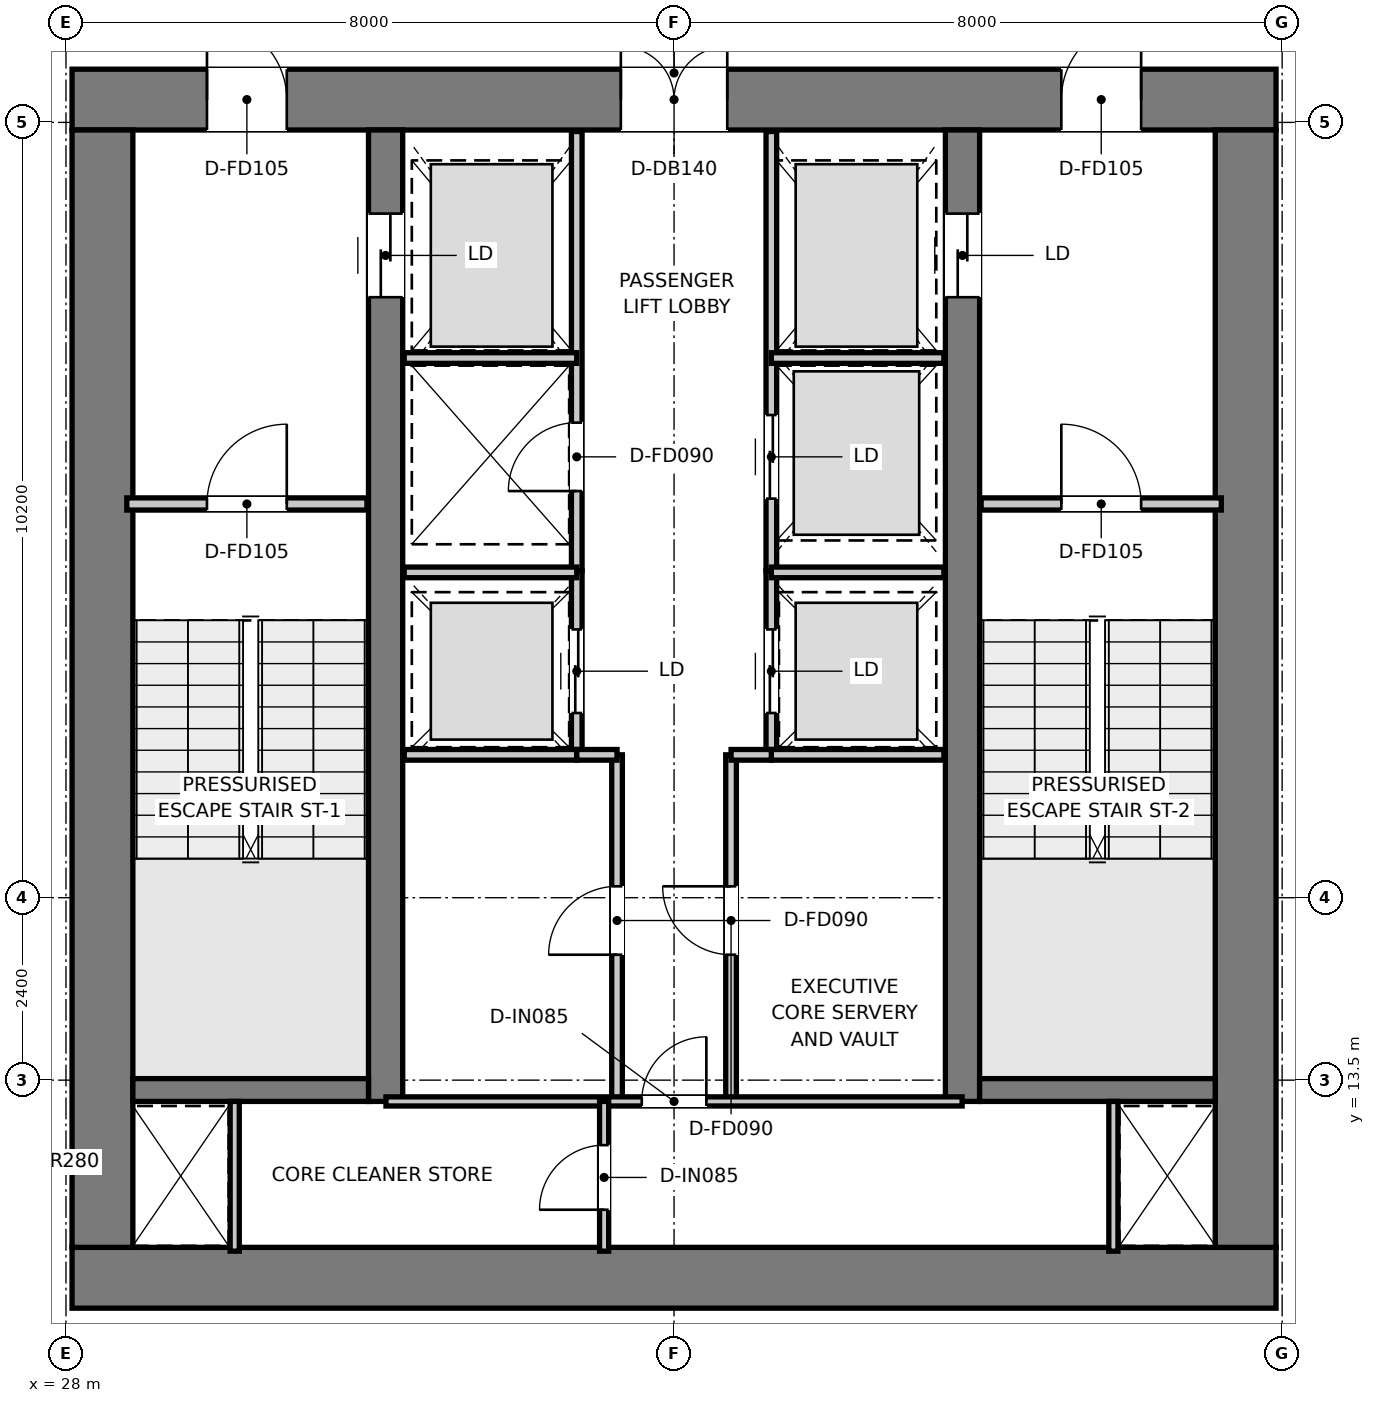
"""IFC4 building model, lengths in metres.
Left out: names, types, materials, properties, quantities, classifications, styles, units other than length and angle.
Written with IfcOpenShell. Run it as: python <this file> out.ifc"""

import sys

from ifc_helpers import new_model, si_unit, direction, frame, frame_2d, origin, place, context, subcontext, project, spatial, rectangle, extrude, element, fill, save


model = new_model("IFC4")
c1 = context("Model", 3, precision=1e-05, world=origin(), true_north=direction((0.0, 1.0)))
c2 = subcontext(c1, "Body", "Model", "MODEL_VIEW")
j1 = project(units=[si_unit("LENGTHUNIT", "METRE"), si_unit("PLANEANGLEUNIT", "RADIAN")], contexts=[c1])
p1 = place(None, origin())
s1 = spatial("IfcSite", under=j1, at=p1, CompositionType="ELEMENT")
p2 = place(p1, origin())
s2 = spatial("IfcBuilding", under=s1, at=p2, CompositionType="ELEMENT")
p3 = place(p2, frame((0.0, 0.0, 295.05)))
s3 = spatial("IfcBuildingStorey", under=s2, at=p3, CompositionType="ELEMENT", Elevation=295.05)
p4 = place(p3, frame((28.08, 10.9, 0.0), z_axis=(0.0, 0.0, 1.0), x_axis=(1.0, 0.0, 0.0)))
e1 = element("IfcWall", 1, at=p4, inside=s3, PredefinedType="SHEAR", context=c2, shape_type="SweptSolid", body=[
    extrude(rectangle(XDim=15.84, YDim=0.8, at=frame_2d((7.92, 0.0))), origin(), (0.0, 0.0, 1.0), 3.95),
])
p5 = place(p3, frame((28.08, 26.4, 0.0), z_axis=(0.0, 0.0, 1.0), x_axis=(1.0, 0.0, 0.0)))
e2 = element("IfcWall", 2, at=p5, inside=s3, PredefinedType="SHEAR", context=c2, shape_type="SweptSolid", body=[
    extrude(rectangle(XDim=15.84, YDim=0.8, at=frame_2d((7.92, 0.0))), origin(), (0.0, 0.0, 1.0), 3.95),
])
p6 = place(p5, frame((7.22, 0.0, 0.0)))
e3 = element("IfcOpeningElement", 3, at=p6, cuts=e2, PredefinedType="OPENING", context=c2, shape_type="SweptSolid", body=[
    extrude(rectangle(XDim=1.4, YDim=2.2, at=frame_2d((0.7, 1.1))), frame((0.0, 0.41, 0.0), z_axis=(0.0, -1.0, 0.0), x_axis=(1.0, 0.0, 0.0)), (0.0, 0.0, 1.0), 0.82),
])
p7 = place(p5, frame((1.775, 0.0, 0.0)))
e4 = element("IfcOpeningElement", 4, at=p7, cuts=e2, PredefinedType="OPENING", context=c2, shape_type="SweptSolid", body=[
    extrude(rectangle(XDim=1.05, YDim=2.1, at=frame_2d((0.525, 1.05))), frame((0.0, 0.41, 0.0), z_axis=(0.0, -1.0, 0.0), x_axis=(1.0, 0.0, 0.0)), (0.0, 0.0, 1.0), 0.82),
])
p8 = place(p5, frame((13.015, 0.0, 0.0)))
e5 = element("IfcOpeningElement", 5, at=p8, cuts=e2, PredefinedType="OPENING", context=c2, shape_type="SweptSolid", body=[
    extrude(rectangle(XDim=1.05, YDim=2.1, at=frame_2d((0.525, 1.05))), frame((0.0, 0.41, 0.0), z_axis=(0.0, -1.0, 0.0), x_axis=(1.0, 0.0, 0.0)), (0.0, 0.0, 1.0), 0.82),
])
for number, where, z_axis, x_axis in (
    (6, (28.48, 11.3, 0.0), (0.0, 0.0, 1.0), (0.0, 1.0, 0.0)),
    (7, (43.52, 11.3, 0.0), (0.0, 0.0, 1.0), (0.0, 1.0, 0.0)),
):
    element("IfcWall", number, at=place(p3, frame(where, z_axis=z_axis, x_axis=x_axis)), inside=s3, PredefinedType="SHEAR", context=c2, shape_type="SweptSolid", body=[
        extrude(rectangle(XDim=14.7, YDim=0.8, at=frame_2d((7.35, 0.0))), origin(), (0.0, 0.0, 1.0), 3.95),
    ])
p9 = place(p3, frame((32.205, 13.22, 0.0), z_axis=(0.0, 0.0, 1.0), x_axis=(0.0, 1.0, 0.0)))
e8 = element("IfcWall", 8, at=p9, inside=s3, PredefinedType="SHEAR", context=c2, shape_type="SweptSolid", body=[
    extrude(rectangle(XDim=12.78, YDim=0.45, at=frame_2d((6.39, 0.0))), origin(), (0.0, 0.0, 1.0), 3.95),
])
p10 = place(p9, frame((10.58, 0.0, 0.0)))
e9 = element("IfcOpeningElement", 9, at=p10, cuts=e8, PredefinedType="OPENING", context=c2, shape_type="SweptSolid", body=[
    extrude(rectangle(XDim=1.1, YDim=2.15, at=frame_2d((0.55, 1.075))), frame((0.0, 0.235, 0.0), z_axis=(0.0, -1.0, 0.0), x_axis=(1.0, 0.0, 0.0)), (0.0, 0.0, 1.0), 0.47),
])
p11 = place(p3, frame((39.795, 13.22, 0.0), z_axis=(0.0, 0.0, 1.0), x_axis=(0.0, 1.0, 0.0)))
e10 = element("IfcWall", 10, at=p11, inside=s3, PredefinedType="SHEAR", context=c2, shape_type="SweptSolid", body=[
    extrude(rectangle(XDim=12.78, YDim=0.45, at=frame_2d((6.39, 0.0))), origin(), (0.0, 0.0, 1.0), 3.95),
])
p12 = place(p11, frame((10.58, 0.0, 0.0)))
e11 = element("IfcOpeningElement", 11, at=p12, cuts=e10, PredefinedType="OPENING", context=c2, shape_type="SweptSolid", body=[
    extrude(rectangle(XDim=1.1, YDim=2.15, at=frame_2d((0.55, 1.075))), frame((0.0, 0.235, 0.0), z_axis=(0.0, -1.0, 0.0), x_axis=(1.0, 0.0, 0.0)), (0.0, 0.0, 1.0), 0.47),
])
for number, where, z_axis, x_axis in (
    (12, (28.88, 13.37, 0.0), (0.0, 0.0, 1.0), (1.0, 0.0, 0.0)),
    (13, (40.02, 13.37, 0.0), (0.0, 0.0, 1.0), (1.0, 0.0, 0.0)),
):
    element("IfcWall", number, at=place(p3, frame(where, z_axis=z_axis, x_axis=x_axis)), inside=s3, PredefinedType="SHEAR", context=c2, shape_type="SweptSolid", body=[
        extrude(rectangle(XDim=3.1, YDim=0.3, at=frame_2d((1.55, 0.0))), origin(), (0.0, 0.0, 1.0), 3.95),
    ])
p13 = place(p3, frame((28.8, 21.08, 0.0), z_axis=(0.0, 0.0, 1.0), x_axis=(1.0, 0.0, 0.0)))
e14 = element("IfcWall", 14, at=p13, inside=s3, PredefinedType="PARTITIONING", context=c2, shape_type="SweptSolid", body=[
    extrude(rectangle(XDim=3.16, YDim=0.16, at=frame_2d((1.58, 0.0))), origin(), (0.0, 0.0, 1.0), 3.67),
])
p14 = place(p13, frame((1.055, 0.0, 0.0)))
e15 = element("IfcOpeningElement", 15, at=p14, cuts=e14, PredefinedType="OPENING", context=c2, shape_type="SweptSolid", body=[
    extrude(rectangle(XDim=1.05, YDim=2.1, at=frame_2d((0.525, 1.05))), frame((0.0, 0.09, 0.0), z_axis=(0.0, -1.0, 0.0), x_axis=(1.0, 0.0, 0.0)), (0.0, 0.0, 1.0), 0.18),
])
p15 = place(p3, frame((40.04, 21.08, 0.0), z_axis=(0.0, 0.0, 1.0), x_axis=(1.0, 0.0, 0.0)))
e16 = element("IfcWall", 16, at=p15, inside=s3, PredefinedType="PARTITIONING", context=c2, shape_type="SweptSolid", body=[
    extrude(rectangle(XDim=3.16, YDim=0.16, at=frame_2d((1.58, 0.0))), origin(), (0.0, 0.0, 1.0), 3.67),
])
p16 = place(p15, frame((1.055, 0.0, 0.0)))
e17 = element("IfcOpeningElement", 17, at=p16, cuts=e16, PredefinedType="OPENING", context=c2, shape_type="SweptSolid", body=[
    extrude(rectangle(XDim=1.05, YDim=2.1, at=frame_2d((0.525, 1.05))), frame((0.0, 0.09, 0.0), z_axis=(0.0, -1.0, 0.0), x_axis=(1.0, 0.0, 0.0)), (0.0, 0.0, 1.0), 0.18),
])
p17 = place(p3, frame((34.72, 20.2, 0.0), z_axis=(0.0, 0.0, 1.0), x_axis=(0.0, 1.0, 0.0)))
e18 = element("IfcWall", 18, at=p17, inside=s3, PredefinedType="PARTITIONING", context=c2, shape_type="SweptSolid", body=[
    extrude(rectangle(XDim=5.78, YDim=0.14, at=frame_2d((2.89, 0.0))), origin(), (0.0, 0.0, 1.0), 2.82),
])
p18 = place(p17, frame((1.05, 0.0, 0.0)))
e19 = element("IfcOpeningElement", 19, at=p18, cuts=e18, PredefinedType="OPENING", context=c2, shape_type="SweptSolid", body=[
    extrude(rectangle(XDim=0.9, YDim=2.1, at=frame_2d((0.45, 1.05))), frame((0.0, 0.08, 0.0), z_axis=(0.0, -1.0, 0.0), x_axis=(1.0, 0.0, 0.0)), (0.0, 0.0, 1.0), 0.16),
])
p19 = place(p3, frame((37.28, 20.2, 0.0), z_axis=(0.0, 0.0, 1.0), x_axis=(0.0, 1.0, 0.0)))
e20 = element("IfcWall", 20, at=p19, inside=s3, PredefinedType="PARTITIONING", context=c2, shape_type="SweptSolid", body=[
    extrude(rectangle(XDim=5.78, YDim=0.14, at=frame_2d((2.89, 0.0))), origin(), (0.0, 0.0, 1.0), 2.82),
])
p20 = place(p19, frame((0.95, 0.0, 0.0)))
e21 = element("IfcOpeningElement", 21, at=p20, cuts=e20, PredefinedType="OPENING", context=c2, shape_type="SweptSolid", body=[
    extrude(rectangle(XDim=1.1, YDim=2.15, at=frame_2d((0.55, 1.075))), frame((0.0, 0.08, 0.0), z_axis=(0.0, -1.0, 0.0), x_axis=(1.0, 0.0, 0.0)), (0.0, 0.0, 1.0), 0.16),
])
for number, where, z_axis, x_axis in (
    (22, (32.45, 23.0, 0.0), (0.0, 0.0, 1.0), (1.0, 0.0, 0.0)),
    (23, (37.28, 23.0, 0.0), (0.0, 0.0, 1.0), (1.0, 0.0, 0.0)),
):
    element("IfcWall", number, at=place(p3, frame(where, z_axis=z_axis, x_axis=x_axis)), inside=s3, PredefinedType="PARTITIONING", context=c2, shape_type="SweptSolid", body=[
        extrude(rectangle(XDim=2.27, YDim=0.14, at=frame_2d((1.135, 0.0))), origin(), (0.0, 0.0, 1.0), 2.82),
    ])
p21 = place(p3, frame((34.72, 17.78, 0.0), z_axis=(0.0, 0.0, 1.0), x_axis=(0.0, 1.0, 0.0)))
e24 = element("IfcWall", 24, at=p21, inside=s3, PredefinedType="PARTITIONING", context=c2, shape_type="SweptSolid", body=[
    extrude(rectangle(XDim=2.42, YDim=0.14, at=frame_2d((1.21, 0.0))), origin(), (0.0, 0.0, 1.0), 3.67),
])
p22 = place(p21, frame((0.55, 0.0, 0.0)))
e25 = element("IfcOpeningElement", 25, at=p22, cuts=e24, PredefinedType="OPENING", context=c2, shape_type="SweptSolid", body=[
    extrude(rectangle(XDim=1.1, YDim=2.15, at=frame_2d((0.55, 1.075))), frame((0.0, 0.08, 0.0), z_axis=(0.0, -1.0, 0.0), x_axis=(1.0, 0.0, 0.0)), (0.0, 0.0, 1.0), 0.16),
])
p23 = place(p3, frame((37.28, 17.78, 0.0), z_axis=(0.0, 0.0, 1.0), x_axis=(0.0, 1.0, 0.0)))
e26 = element("IfcWall", 26, at=p23, inside=s3, PredefinedType="PARTITIONING", context=c2, shape_type="SweptSolid", body=[
    extrude(rectangle(XDim=2.42, YDim=0.14, at=frame_2d((1.21, 0.0))), origin(), (0.0, 0.0, 1.0), 3.67),
])
p24 = place(p23, frame((0.55, 0.0, 0.0)))
e27 = element("IfcOpeningElement", 27, at=p24, cuts=e26, PredefinedType="OPENING", context=c2, shape_type="SweptSolid", body=[
    extrude(rectangle(XDim=1.1, YDim=2.15, at=frame_2d((0.55, 1.075))), frame((0.0, 0.08, 0.0), z_axis=(0.0, -1.0, 0.0), x_axis=(1.0, 0.0, 0.0)), (0.0, 0.0, 1.0), 0.16),
])
for number, where, z_axis, x_axis in (
    (28, (32.45, 17.78, 0.0), (0.0, 0.0, 1.0), (1.0, 0.0, 0.0)),
    (29, (32.45, 20.18, 0.0), (0.0, 0.0, 1.0), (1.0, 0.0, 0.0)),
    (30, (37.28, 17.78, 0.0), (0.0, 0.0, 1.0), (1.0, 0.0, 0.0)),
    (31, (37.28, 20.18, 0.0), (0.0, 0.0, 1.0), (1.0, 0.0, 0.0)),
):
    element("IfcWall", number, at=place(p3, frame(where, z_axis=z_axis, x_axis=x_axis)), inside=s3, PredefinedType="PARTITIONING", context=c2, shape_type="SweptSolid", body=[
        extrude(rectangle(XDim=2.27, YDim=0.14, at=frame_2d((1.135, 0.0))), origin(), (0.0, 0.0, 1.0), 3.67),
    ])
p25 = place(p3, frame((35.25, 13.22, 0.0), z_axis=(0.0, 0.0, 1.0), x_axis=(0.0, 1.0, 0.0)))
e32 = element("IfcWall", 32, at=p25, inside=s3, PredefinedType="PARTITIONING", context=c2, shape_type="SweptSolid", body=[
    extrude(rectangle(XDim=4.56, YDim=0.14, at=frame_2d((2.28, 0.0))), origin(), (0.0, 0.0, 1.0), 3.67),
])
p26 = place(p25, frame((1.93, 0.0, 0.0)))
e33 = element("IfcOpeningElement", 33, at=p26, cuts=e32, PredefinedType="OPENING", context=c2, shape_type="SweptSolid", body=[
    extrude(rectangle(XDim=0.9, YDim=2.1, at=frame_2d((0.45, 1.05))), frame((0.0, 0.08, 0.0), z_axis=(0.0, -1.0, 0.0), x_axis=(1.0, 0.0, 0.0)), (0.0, 0.0, 1.0), 0.16),
])
p27 = place(p3, frame((34.72, 17.78, 0.0), z_axis=(0.0, 0.0, 1.0), x_axis=(1.0, 0.0, 0.0)))
e34 = element("IfcWall", 34, at=p27, inside=s3, PredefinedType="PARTITIONING", context=c2, shape_type="SweptSolid", body=[
    extrude(rectangle(XDim=0.53, YDim=0.14, at=frame_2d((0.265, 0.0))), origin(), (0.0, 0.0, 1.0), 3.67),
])
p28 = place(p3, frame((36.75, 13.22, 0.0), z_axis=(0.0, 0.0, 1.0), x_axis=(0.0, 1.0, 0.0)))
e35 = element("IfcWall", 35, at=p28, inside=s3, PredefinedType="PARTITIONING", context=c2, shape_type="SweptSolid", body=[
    extrude(rectangle(XDim=4.56, YDim=0.14, at=frame_2d((2.28, 0.0))), origin(), (0.0, 0.0, 1.0), 3.67),
])
p29 = place(p28, frame((1.93, 0.0, 0.0)))
e36 = element("IfcOpeningElement", 36, at=p29, cuts=e35, PredefinedType="OPENING", context=c2, shape_type="SweptSolid", body=[
    extrude(rectangle(XDim=0.9, YDim=2.1, at=frame_2d((0.45, 1.05))), frame((0.0, 0.08, 0.0), z_axis=(0.0, -1.0, 0.0), x_axis=(1.0, 0.0, 0.0)), (0.0, 0.0, 1.0), 0.16),
])
p30 = place(p3, frame((36.75, 17.78, 0.0), z_axis=(0.0, 0.0, 1.0), x_axis=(1.0, 0.0, 0.0)))
e37 = element("IfcWall", 37, at=p30, inside=s3, PredefinedType="PARTITIONING", context=c2, shape_type="SweptSolid", body=[
    extrude(rectangle(XDim=0.53, YDim=0.14, at=frame_2d((0.265, 0.0))), origin(), (0.0, 0.0, 1.0), 3.67),
])
for number, where, z_axis, x_axis in (
    (38, (30.22, 11.25, 0.0), (0.0, 0.0, 1.0), (0.0, 1.0, 0.0)),
    (39, (41.78, 11.25, 0.0), (0.0, 0.0, 1.0), (0.0, 1.0, 0.0)),
):
    element("IfcWall", number, at=place(p3, frame(where, z_axis=z_axis, x_axis=x_axis)), inside=s3, PredefinedType="PARTITIONING", context=c2, shape_type="SweptSolid", body=[
        extrude(rectangle(XDim=1.97, YDim=0.12, at=frame_2d((0.985, 0.0))), origin(), (0.0, 0.0, 1.0), 3.67),
    ])
p31 = place(p3, frame((32.21, 13.22, 0.0), z_axis=(0.0, 0.0, 1.0), x_axis=(1.0, 0.0, 0.0)))
e40 = element("IfcWall", 40, at=p31, inside=s3, PredefinedType="PARTITIONING", context=c2, shape_type="SweptSolid", body=[
    extrude(rectangle(XDim=7.58, YDim=0.12, at=frame_2d((3.79, 0.0))), origin(), (0.0, 0.0, 1.0), 3.67),
])
p32 = place(p31, frame((3.365, 0.0, 0.0)))
e41 = element("IfcOpeningElement", 41, at=p32, cuts=e40, PredefinedType="OPENING", context=c2, shape_type="SweptSolid", body=[
    extrude(rectangle(XDim=0.85, YDim=2.1, at=frame_2d((0.425, 1.05))), frame((0.0, 0.07, 0.0), z_axis=(0.0, -1.0, 0.0), x_axis=(1.0, 0.0, 0.0)), (0.0, 0.0, 1.0), 0.14),
])
p33 = place(p3, frame((35.08, 11.25, 0.0), z_axis=(0.0, 0.0, 1.0), x_axis=(0.0, 1.0, 0.0)))
e42 = element("IfcWall", 42, at=p33, inside=s3, PredefinedType="PARTITIONING", context=c2, shape_type="SweptSolid", body=[
    extrude(rectangle(XDim=1.97, YDim=0.12, at=frame_2d((0.985, 0.0))), origin(), (0.0, 0.0, 1.0), 3.67),
])
p34 = place(p33, frame((0.545, 0.0, 0.0)))
e43 = element("IfcOpeningElement", 43, at=p34, cuts=e42, PredefinedType="OPENING", context=c2, shape_type="SweptSolid", body=[
    extrude(rectangle(XDim=0.85, YDim=2.1, at=frame_2d((0.425, 1.05))), frame((0.0, 0.07, 0.0), z_axis=(0.0, -1.0, 0.0), x_axis=(1.0, 0.0, 0.0)), (0.0, 0.0, 1.0), 0.14),
])
p35 = place(p14, origin())
e44 = element("IfcDoor", 44, at=p35, inside=s3, OperationType="SINGLE_SWING_RIGHT", PredefinedType="DOOR", context=c2, shape_type="SweptSolid", body=[
    extrude(rectangle(XDim=1.05, YDim=2.1, at=frame_2d((0.525, 1.05))), frame((0.0, 0.025, 0.0), z_axis=(0.0, -1.0, 0.0), x_axis=(1.0, 0.0, 0.0)), (0.0, 0.0, 1.0), 0.05),
])
fill(e15, e44)
p36 = place(p16, origin())
e45 = element("IfcDoor", 45, at=p36, inside=s3, OperationType="SINGLE_SWING_LEFT", PredefinedType="DOOR", context=c2, shape_type="SweptSolid", body=[
    extrude(rectangle(XDim=1.05, YDim=2.1, at=frame_2d((0.525, 1.05))), frame((0.0, 0.025, 0.0), z_axis=(0.0, -1.0, 0.0), x_axis=(1.0, 0.0, 0.0)), (0.0, 0.0, 1.0), 0.05),
])
fill(e17, e45)
p37 = place(p6, origin())
e46 = element("IfcDoor", 46, at=p37, inside=s3, OperationType="DOUBLE_DOOR_SINGLE_SWING", PredefinedType="DOOR", context=c2, shape_type="SweptSolid", body=[
    extrude(rectangle(XDim=1.4, YDim=2.2, at=frame_2d((0.7, 1.1))), frame((0.0, 0.025, 0.0), z_axis=(0.0, -1.0, 0.0), x_axis=(1.0, 0.0, 0.0)), (0.0, 0.0, 1.0), 0.05),
])
fill(e3, e46)
p38 = place(p7, origin())
e47 = element("IfcDoor", 47, at=p38, inside=s3, OperationType="SINGLE_SWING_LEFT", PredefinedType="DOOR", context=c2, shape_type="SweptSolid", body=[
    extrude(rectangle(XDim=1.05, YDim=2.1, at=frame_2d((0.525, 1.05))), frame((0.0, 0.025, 0.0), z_axis=(0.0, -1.0, 0.0), x_axis=(1.0, 0.0, 0.0)), (0.0, 0.0, 1.0), 0.05),
])
fill(e4, e47)
p39 = place(p8, origin())
e48 = element("IfcDoor", 48, at=p39, inside=s3, OperationType="SINGLE_SWING_RIGHT", PredefinedType="DOOR", context=c2, shape_type="SweptSolid", body=[
    extrude(rectangle(XDim=1.05, YDim=2.1, at=frame_2d((0.525, 1.05))), frame((0.0, 0.025, 0.0), z_axis=(0.0, -1.0, 0.0), x_axis=(1.0, 0.0, 0.0)), (0.0, 0.0, 1.0), 0.05),
])
fill(e5, e48)
p40 = place(p10, origin())
e49 = element("IfcDoor", 49, at=p40, inside=s3, OperationType="DOUBLE_DOOR_SLIDING", PredefinedType="DOOR", context=c2, shape_type="SweptSolid", body=[
    extrude(rectangle(XDim=1.1, YDim=2.15, at=frame_2d((0.55, 1.075))), frame((0.0, 0.025, 0.0), z_axis=(0.0, -1.0, 0.0), x_axis=(1.0, 0.0, 0.0)), (0.0, 0.0, 1.0), 0.05),
])
fill(e9, e49)
p41 = place(p12, origin())
e50 = element("IfcDoor", 50, at=p41, inside=s3, OperationType="DOUBLE_DOOR_SLIDING", PredefinedType="DOOR", context=c2, shape_type="SweptSolid", body=[
    extrude(rectangle(XDim=1.1, YDim=2.15, at=frame_2d((0.55, 1.075))), frame((0.0, 0.025, 0.0), z_axis=(0.0, -1.0, 0.0), x_axis=(1.0, 0.0, 0.0)), (0.0, 0.0, 1.0), 0.05),
])
fill(e11, e50)
p42 = place(p18, origin())
e51 = element("IfcDoor", 51, at=p42, inside=s3, OperationType="SINGLE_SWING_LEFT", PredefinedType="DOOR", context=c2, shape_type="SweptSolid", body=[
    extrude(rectangle(XDim=0.9, YDim=2.1, at=frame_2d((0.45, 1.05))), frame((0.0, 0.025, 0.0), z_axis=(0.0, -1.0, 0.0), x_axis=(1.0, 0.0, 0.0)), (0.0, 0.0, 1.0), 0.05),
])
fill(e19, e51)
p43 = place(p20, origin())
e52 = element("IfcDoor", 52, at=p43, inside=s3, OperationType="DOUBLE_DOOR_SLIDING", PredefinedType="DOOR", context=c2, shape_type="SweptSolid", body=[
    extrude(rectangle(XDim=1.1, YDim=2.15, at=frame_2d((0.55, 1.075))), frame((0.0, 0.025, 0.0), z_axis=(0.0, -1.0, 0.0), x_axis=(1.0, 0.0, 0.0)), (0.0, 0.0, 1.0), 0.05),
])
fill(e21, e52)
p44 = place(p22, origin())
e53 = element("IfcDoor", 53, at=p44, inside=s3, OperationType="DOUBLE_DOOR_SLIDING", PredefinedType="DOOR", context=c2, shape_type="SweptSolid", body=[
    extrude(rectangle(XDim=1.1, YDim=2.15, at=frame_2d((0.55, 1.075))), frame((0.0, 0.025, 0.0), z_axis=(0.0, -1.0, 0.0), x_axis=(1.0, 0.0, 0.0)), (0.0, 0.0, 1.0), 0.05),
])
fill(e25, e53)
p45 = place(p24, origin())
e54 = element("IfcDoor", 54, at=p45, inside=s3, OperationType="DOUBLE_DOOR_SLIDING", PredefinedType="DOOR", context=c2, shape_type="SweptSolid", body=[
    extrude(rectangle(XDim=1.1, YDim=2.15, at=frame_2d((0.55, 1.075))), frame((0.0, 0.025, 0.0), z_axis=(0.0, -1.0, 0.0), x_axis=(1.0, 0.0, 0.0)), (0.0, 0.0, 1.0), 0.05),
])
fill(e27, e54)
p46 = place(p26, origin())
e55 = element("IfcDoor", 55, at=p46, inside=s3, OperationType="SINGLE_SWING_LEFT", PredefinedType="DOOR", context=c2, shape_type="SweptSolid", body=[
    extrude(rectangle(XDim=0.9, YDim=2.1, at=frame_2d((0.45, 1.05))), frame((0.0, 0.025, 0.0), z_axis=(0.0, -1.0, 0.0), x_axis=(1.0, 0.0, 0.0)), (0.0, 0.0, 1.0), 0.05),
])
fill(e33, e55)
p47 = place(p29, origin())
e56 = element("IfcDoor", 56, at=p47, inside=s3, OperationType="SINGLE_SWING_RIGHT", PredefinedType="DOOR", context=c2, shape_type="SweptSolid", body=[
    extrude(rectangle(XDim=0.9, YDim=2.1, at=frame_2d((0.45, 1.05))), frame((0.0, 0.025, 0.0), z_axis=(0.0, -1.0, 0.0), x_axis=(1.0, 0.0, 0.0)), (0.0, 0.0, 1.0), 0.05),
])
fill(e36, e56)
p48 = place(p32, origin())
e57 = element("IfcDoor", 57, at=p48, inside=s3, OperationType="SINGLE_SWING_RIGHT", PredefinedType="DOOR", context=c2, shape_type="SweptSolid", body=[
    extrude(rectangle(XDim=0.85, YDim=2.1, at=frame_2d((0.425, 1.05))), frame((0.0, 0.025, 0.0), z_axis=(0.0, -1.0, 0.0), x_axis=(1.0, 0.0, 0.0)), (0.0, 0.0, 1.0), 0.05),
])
fill(e41, e57)
p49 = place(p34, origin())
e58 = element("IfcDoor", 58, at=p49, inside=s3, OperationType="SINGLE_SWING_LEFT", PredefinedType="DOOR", context=c2, shape_type="SweptSolid", body=[
    extrude(rectangle(XDim=0.85, YDim=2.1, at=frame_2d((0.425, 1.05))), frame((0.0, 0.025, 0.0), z_axis=(0.0, -1.0, 0.0), x_axis=(1.0, 0.0, 0.0)), (0.0, 0.0, 1.0), 0.05),
])
fill(e43, e58)
save(model, sys.argv[1])
